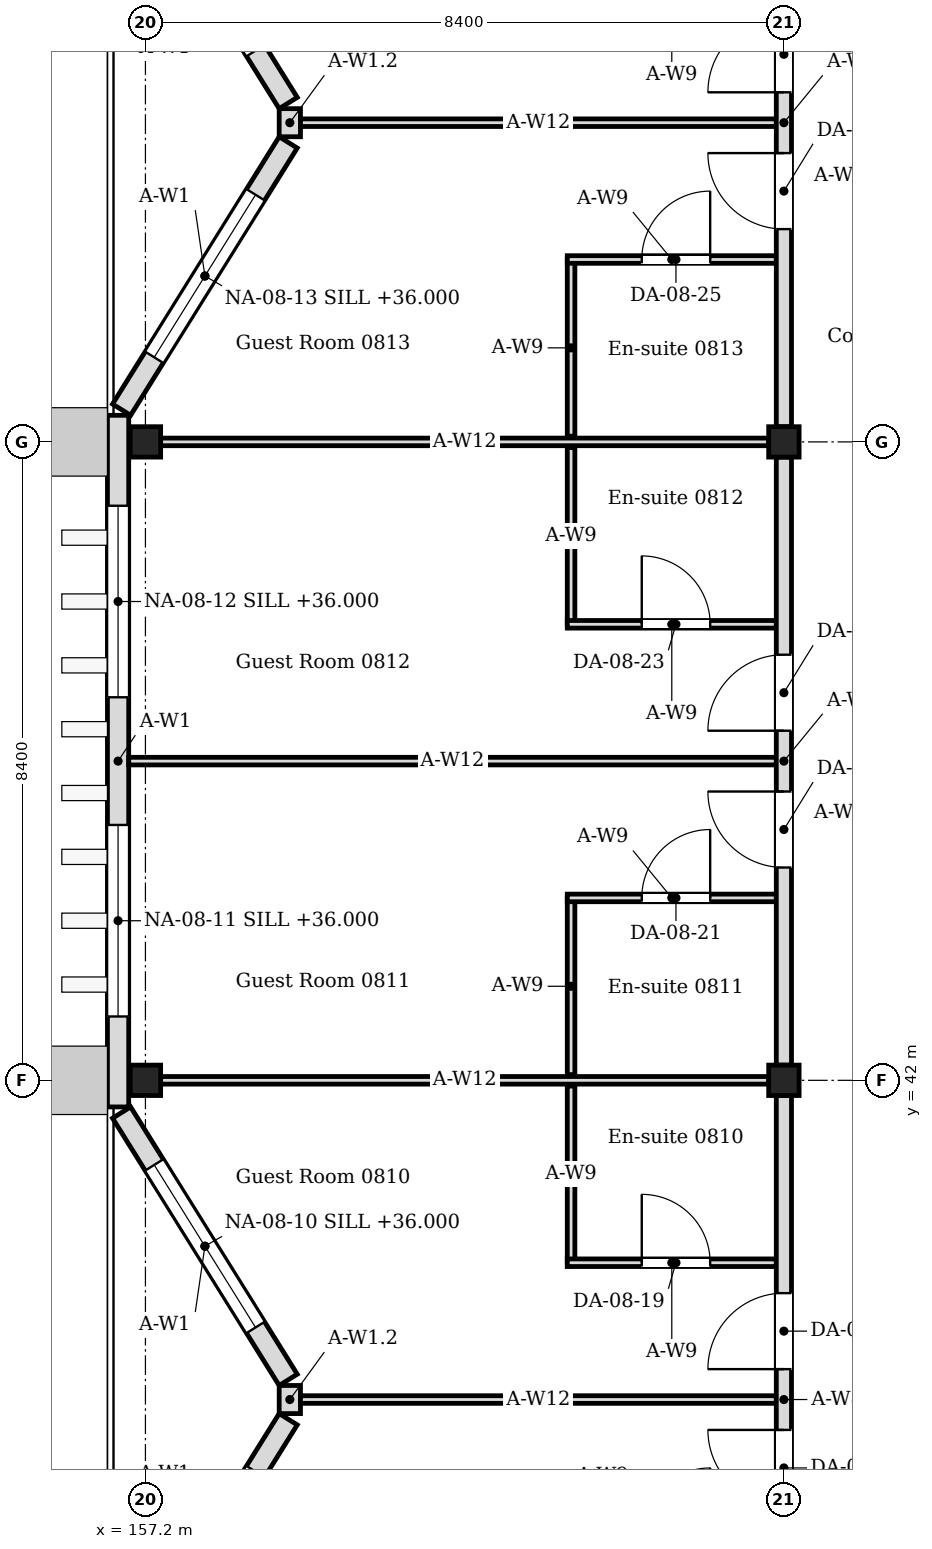
"""IFC4 building model, lengths in metres.
Left out: names, types, materials, properties, quantities, classifications, styles, units other than length and angle.
Written with IfcOpenShell. Run it as: python <this file> out.ifc"""

import sys

from ifc_helpers import new_model, si_unit, direction, frame, frame_2d, origin, origin_2d, place, context, subcontext, project, spatial, rectangle, i_section, extrude, element, fill, save


model = new_model("IFC4")
c1 = context("Model", 3, precision=1e-05, world=origin(), true_north=direction((0.0, 1.0)))
c2 = subcontext(c1, "Body", "Model", "MODEL_VIEW")
j1 = project(units=[si_unit("LENGTHUNIT", "METRE"), si_unit("PLANEANGLEUNIT", "RADIAN")], contexts=[c1])
p1 = place(None, origin())
s1 = spatial("IfcSite", under=j1, at=p1, CompositionType="ELEMENT")
p2 = place(p1, origin())
s2 = spatial("IfcBuilding", under=s1, at=p2, CompositionType="ELEMENT")
p3 = place(p2, frame((0.0, 0.0, 35.4)))
s3 = spatial("IfcBuildingStorey", under=s2, at=p3, CompositionType="ELEMENT", Elevation=35.4)
for number, where, z_axis, x_axis in (
    (1, (157.2, 42.0, 0.0), (0.0, 0.0, 1.0), (1.0, 0.0, 0.0)),
    (2, (157.2, 50.4, 0.0), (0.0, 0.0, 1.0), (1.0, 0.0, 0.0)),
    (3, (165.6, 42.0, 0.0), (0.0, 0.0, 1.0), (1.0, 0.0, 0.0)),
    (4, (165.6, 50.4, 0.0), (0.0, 0.0, 1.0), (1.0, 0.0, 0.0)),
):
    element("IfcColumn", number, at=place(p3, frame(where, z_axis=z_axis, x_axis=x_axis)), inside=s3, PredefinedType="COLUMN", context=c2, shape_type="SweptSolid", body=[
        extrude(i_section(OverallWidth=0.4, OverallDepth=0.4, WebThickness=0.013, FlangeThickness=0.021, FilletRadius=0.022, at=origin_2d()), origin(), (0.0, 0.0, 1.0), 4.2),
    ])
p4 = place(p3, frame((156.886, 34.024, 0.0), z_axis=(0.0, 0.0, 1.0), x_axis=(0.529018946142, 0.848610013271, 0.0)))
e5 = element("IfcWall", 5, at=p4, inside=s3, PredefinedType="SOLIDWALL", context=c2, shape_type="SweptSolid", body=[
    extrude(rectangle(XDim=4.144, YDim=0.28, at=frame_2d((2.072, 0.0))), origin(), (0.0, 0.0, 1.0), 4.05),
])
p5 = place(p4, frame((0.812, 0.0, 0.6)))
e6 = element("IfcOpeningElement", 6, at=p5, cuts=e5, PredefinedType="OPENING", context=c2, shape_type="SweptSolid", body=[
    extrude(rectangle(XDim=2.52, YDim=2.4, at=frame_2d((1.26, 1.2))), frame((0.0, 0.15, 0.0), z_axis=(0.0, -1.0, 0.0), x_axis=(1.0, 0.0, 0.0)), (0.0, 0.0, 1.0), 0.3),
])
p6 = place(p3, frame((159.079, 38.059, 0.0), z_axis=(0.0, 0.0, 1.0), x_axis=(-0.529018946142, 0.848610013271, 0.0)))
e7 = element("IfcWall", 7, at=p6, inside=s3, PredefinedType="SOLIDWALL", context=c2, shape_type="SweptSolid", body=[
    extrude(rectangle(XDim=4.144, YDim=0.28, at=frame_2d((2.072, 0.0))), origin(), (0.0, 0.0, 1.0), 4.05),
])
p7 = place(p6, frame((0.812, 0.0, 0.6)))
e8 = element("IfcOpeningElement", 8, at=p7, cuts=e7, PredefinedType="OPENING", context=c2, shape_type="SweptSolid", body=[
    extrude(rectangle(XDim=2.52, YDim=2.4, at=frame_2d((1.26, 1.2))), frame((0.0, 0.15, 0.0), z_axis=(0.0, -1.0, 0.0), x_axis=(1.0, 0.0, 0.0)), (0.0, 0.0, 1.0), 0.3),
])
p8 = place(p3, frame((159.1, 37.615, 0.0), z_axis=(0.0, 0.0, 1.0), x_axis=(0.0, 1.0, 0.0)))
e9 = element("IfcWall", 9, at=p8, inside=s3, PredefinedType="SOLIDWALL", context=c2, shape_type="SweptSolid", body=[
    extrude(rectangle(XDim=0.37, YDim=0.28, at=frame_2d((0.185, 0.0))), origin(), (0.0, 0.0, 1.0), 3.604),
])
p9 = place(p3, frame((156.84, 41.65, 0.0), z_axis=(0.0, 0.0, 1.0), x_axis=(0.0, 1.0, 0.0)))
e10 = element("IfcWall", 10, at=p9, inside=s3, PredefinedType="SOLIDWALL", context=c2, shape_type="SweptSolid", body=[
    extrude(rectangle(XDim=9.1, YDim=0.28, at=frame_2d((4.55, 0.0))), origin(), (0.0, 0.0, 1.0), 4.05),
])
p10 = place(p9, frame((1.19, 0.0, 0.6)))
e11 = element("IfcOpeningElement", 11, at=p10, cuts=e10, PredefinedType="OPENING", context=c2, shape_type="SweptSolid", body=[
    extrude(rectangle(XDim=2.52, YDim=2.4, at=frame_2d((1.26, 1.2))), frame((0.0, 0.15, 0.0), z_axis=(0.0, -1.0, 0.0), x_axis=(1.0, 0.0, 0.0)), (0.0, 0.0, 1.0), 0.3),
])
p11 = place(p9, frame((5.39, 0.0, 0.6)))
e12 = element("IfcOpeningElement", 12, at=p11, cuts=e10, PredefinedType="OPENING", context=c2, shape_type="SweptSolid", body=[
    extrude(rectangle(XDim=2.52, YDim=2.4, at=frame_2d((1.26, 1.2))), frame((0.0, 0.15, 0.0), z_axis=(0.0, -1.0, 0.0), x_axis=(1.0, 0.0, 0.0)), (0.0, 0.0, 1.0), 0.3),
])
p12 = place(p3, frame((156.886, 50.824, 0.0), z_axis=(0.0, 0.0, 1.0), x_axis=(0.529018946142, 0.848610013271, 0.0)))
e13 = element("IfcWall", 13, at=p12, inside=s3, PredefinedType="SOLIDWALL", context=c2, shape_type="SweptSolid", body=[
    extrude(rectangle(XDim=4.144, YDim=0.28, at=frame_2d((2.072, 0.0))), origin(), (0.0, 0.0, 1.0), 4.05),
])
p13 = place(p12, frame((0.812, 0.0, 0.6)))
e14 = element("IfcOpeningElement", 14, at=p13, cuts=e13, PredefinedType="OPENING", context=c2, shape_type="SweptSolid", body=[
    extrude(rectangle(XDim=2.52, YDim=2.4, at=frame_2d((1.26, 1.2))), frame((0.0, 0.15, 0.0), z_axis=(0.0, -1.0, 0.0), x_axis=(1.0, 0.0, 0.0)), (0.0, 0.0, 1.0), 0.3),
])
p14 = place(p3, frame((159.079, 54.859, 0.0), z_axis=(0.0, 0.0, 1.0), x_axis=(-0.528992500338, 0.848626498871, 0.0)))
e15 = element("IfcWall", 15, at=p14, inside=s3, PredefinedType="SOLIDWALL", context=c2, shape_type="SweptSolid", body=[
    extrude(rectangle(XDim=4.145, YDim=0.28, at=frame_2d((2.072, 0.0))), origin(), (0.0, 0.0, 1.0), 4.05),
])
p15 = place(p14, frame((0.812, 0.0, 0.6)))
e16 = element("IfcOpeningElement", 16, at=p15, cuts=e15, PredefinedType="OPENING", context=c2, shape_type="SweptSolid", body=[
    extrude(rectangle(XDim=2.52, YDim=2.4, at=frame_2d((1.26, 1.2))), frame((0.0, 0.15, 0.0), z_axis=(0.0, -1.0, 0.0), x_axis=(1.0, 0.0, 0.0)), (0.0, 0.0, 1.0), 0.3),
])
p16 = place(p3, frame((159.1, 54.415, 0.0), z_axis=(0.0, 0.0, 1.0), x_axis=(0.0, 1.0, 0.0)))
e17 = element("IfcWall", 17, at=p16, inside=s3, PredefinedType="SOLIDWALL", context=c2, shape_type="SweptSolid", body=[
    extrude(rectangle(XDim=0.37, YDim=0.28, at=frame_2d((0.185, 0.0))), origin(), (0.0, 0.0, 1.0), 3.604),
])
p17 = place(p3, frame((162.8, 39.6, 0.0), z_axis=(0.0, 0.0, 1.0), x_axis=(0.0, 1.0, 0.0)))
e18 = element("IfcWall", 18, at=p17, inside=s3, PredefinedType="PARTITIONING", context=c2, shape_type="SweptSolid", body=[
    extrude(rectangle(XDim=2.325, YDim=0.1, at=frame_2d((1.163, 0.0))), origin(), (0.0, 0.0, 1.0), 4.05),
])
p18 = place(p3, frame((162.75, 39.6, 0.0), z_axis=(0.0, 0.0, 1.0), x_axis=(1.0, 0.0, 0.0)))
e19 = element("IfcWall", 19, at=p18, inside=s3, PredefinedType="PARTITIONING", context=c2, shape_type="SweptSolid", body=[
    extrude(rectangle(XDim=2.75, YDim=0.1, at=frame_2d((1.375, 0.0))), origin(), (0.0, 0.0, 1.0), 4.05),
])
p19 = place(p18, frame((0.98, 0.0, 0.0)))
e20 = element("IfcOpeningElement", 20, at=p19, cuts=e19, PredefinedType="OPENING", context=c2, shape_type="SweptSolid", body=[
    extrude(rectangle(XDim=0.9, YDim=2.1, at=frame_2d((0.45, 1.05))), frame((0.0, 0.06, 0.0), z_axis=(0.0, -1.0, 0.0), x_axis=(1.0, 0.0, 0.0)), (0.0, 0.0, 1.0), 0.12),
])
p20 = place(p3, frame((162.8, 42.075, 0.0), z_axis=(0.0, 0.0, 1.0), x_axis=(0.0, 1.0, 0.0)))
e21 = element("IfcWall", 21, at=p20, inside=s3, PredefinedType="PARTITIONING", context=c2, shape_type="SweptSolid", body=[
    extrude(rectangle(XDim=2.325, YDim=0.1, at=frame_2d((1.163, 0.0))), origin(), (0.0, 0.0, 1.0), 4.05),
])
p21 = place(p3, frame((162.75, 44.4, 0.0), z_axis=(0.0, 0.0, 1.0), x_axis=(1.0, 0.0, 0.0)))
e22 = element("IfcWall", 22, at=p21, inside=s3, PredefinedType="PARTITIONING", context=c2, shape_type="SweptSolid", body=[
    extrude(rectangle(XDim=2.75, YDim=0.1, at=frame_2d((1.375, 0.0))), origin(), (0.0, 0.0, 1.0), 4.05),
])
p22 = place(p21, frame((0.98, 0.0, 0.0)))
e23 = element("IfcOpeningElement", 23, at=p22, cuts=e22, PredefinedType="OPENING", context=c2, shape_type="SweptSolid", body=[
    extrude(rectangle(XDim=0.9, YDim=2.1, at=frame_2d((0.45, 1.05))), frame((0.0, 0.06, 0.0), z_axis=(0.0, -1.0, 0.0), x_axis=(1.0, 0.0, 0.0)), (0.0, 0.0, 1.0), 0.12),
])
p23 = place(p3, frame((162.8, 48.0, 0.0), z_axis=(0.0, 0.0, 1.0), x_axis=(0.0, 1.0, 0.0)))
e24 = element("IfcWall", 24, at=p23, inside=s3, PredefinedType="PARTITIONING", context=c2, shape_type="SweptSolid", body=[
    extrude(rectangle(XDim=2.325, YDim=0.1, at=frame_2d((1.163, 0.0))), origin(), (0.0, 0.0, 1.0), 4.05),
])
p24 = place(p3, frame((162.75, 48.0, 0.0), z_axis=(0.0, 0.0, 1.0), x_axis=(1.0, 0.0, 0.0)))
e25 = element("IfcWall", 25, at=p24, inside=s3, PredefinedType="PARTITIONING", context=c2, shape_type="SweptSolid", body=[
    extrude(rectangle(XDim=2.75, YDim=0.1, at=frame_2d((1.375, 0.0))), origin(), (0.0, 0.0, 1.0), 4.05),
])
p25 = place(p24, frame((0.98, 0.0, 0.0)))
e26 = element("IfcOpeningElement", 26, at=p25, cuts=e25, PredefinedType="OPENING", context=c2, shape_type="SweptSolid", body=[
    extrude(rectangle(XDim=0.9, YDim=2.1, at=frame_2d((0.45, 1.05))), frame((0.0, 0.06, 0.0), z_axis=(0.0, -1.0, 0.0), x_axis=(1.0, 0.0, 0.0)), (0.0, 0.0, 1.0), 0.12),
])
p26 = place(p3, frame((162.8, 50.475, 0.0), z_axis=(0.0, 0.0, 1.0), x_axis=(0.0, 1.0, 0.0)))
e27 = element("IfcWall", 27, at=p26, inside=s3, PredefinedType="PARTITIONING", context=c2, shape_type="SweptSolid", body=[
    extrude(rectangle(XDim=2.325, YDim=0.1, at=frame_2d((1.163, 0.0))), origin(), (0.0, 0.0, 1.0), 4.05),
])
p27 = place(p3, frame((162.75, 52.8, 0.0), z_axis=(0.0, 0.0, 1.0), x_axis=(1.0, 0.0, 0.0)))
e28 = element("IfcWall", 28, at=p27, inside=s3, PredefinedType="PARTITIONING", context=c2, shape_type="SweptSolid", body=[
    extrude(rectangle(XDim=2.75, YDim=0.1, at=frame_2d((1.375, 0.0))), origin(), (0.0, 0.0, 1.0), 4.05),
])
p28 = place(p27, frame((0.98, 0.0, 0.0)))
e29 = element("IfcOpeningElement", 29, at=p28, cuts=e28, PredefinedType="OPENING", context=c2, shape_type="SweptSolid", body=[
    extrude(rectangle(XDim=0.9, YDim=2.1, at=frame_2d((0.45, 1.05))), frame((0.0, 0.06, 0.0), z_axis=(0.0, -1.0, 0.0), x_axis=(1.0, 0.0, 0.0)), (0.0, 0.0, 1.0), 0.12),
])
for number, where, z_axis, x_axis in (
    (30, (157.4, 42.0, 0.0), (0.0, 0.0, 1.0), (1.0, 0.0, 0.0)),
    (31, (157.4, 50.4, 0.0), (0.0, 0.0, 1.0), (1.0, 0.0, 0.0)),
):
    element("IfcWall", number, at=place(p3, frame(where, z_axis=z_axis, x_axis=x_axis)), inside=s3, PredefinedType="PARTITIONING", context=c2, shape_type="SweptSolid", body=[
        extrude(rectangle(XDim=8.0, YDim=0.1, at=frame_2d((4.0, 0.0))), origin(), (0.0, 0.0, 1.0), 3.604),
    ])
p29 = place(p3, frame((159.24, 37.8, 0.0), z_axis=(0.0, 0.0, 1.0), x_axis=(1.0, 0.0, 0.0)))
e32 = element("IfcWall", 32, at=p29, inside=s3, PredefinedType="PARTITIONING", context=c2, shape_type="SweptSolid", body=[
    extrude(rectangle(XDim=6.26, YDim=0.1, at=frame_2d((3.13, 0.0))), origin(), (0.0, 0.0, 1.0), 3.604),
])
p30 = place(p3, frame((156.98, 46.2, 0.0), z_axis=(0.0, 0.0, 1.0), x_axis=(1.0, 0.0, 0.0)))
e33 = element("IfcWall", 33, at=p30, inside=s3, PredefinedType="PARTITIONING", context=c2, shape_type="SweptSolid", body=[
    extrude(rectangle(XDim=8.52, YDim=0.1, at=frame_2d((4.26, 0.0))), origin(), (0.0, 0.0, 1.0), 3.604),
])
p31 = place(p3, frame((159.24, 54.6, 0.0), z_axis=(0.0, 0.0, 1.0), x_axis=(1.0, 0.0, 0.0)))
e34 = element("IfcWall", 34, at=p31, inside=s3, PredefinedType="PARTITIONING", context=c2, shape_type="SweptSolid", body=[
    extrude(rectangle(XDim=6.26, YDim=0.1, at=frame_2d((3.13, 0.0))), origin(), (0.0, 0.0, 1.0), 3.604),
])
p32 = place(p3, frame((165.6, 33.8, 0.0), z_axis=(0.0, 0.0, 1.0), x_axis=(0.0, 1.0, 0.0)))
e35 = element("IfcWall", 35, at=p32, inside=s3, PredefinedType="PARTITIONING", context=c2, shape_type="SweptSolid", body=[
    extrude(rectangle(XDim=8.0, YDim=0.2, at=frame_2d((4.0, 0.0))), origin(), (0.0, 0.0, 1.0), 3.45),
])
p33 = place(p32, frame((2.6, 0.0, 0.0)))
e36 = element("IfcOpeningElement", 36, at=p33, cuts=e35, PredefinedType="OPENING", context=c2, shape_type="SweptSolid", body=[
    extrude(rectangle(XDim=1.0, YDim=2.4, at=frame_2d((0.5, 1.2))), frame((0.0, 0.11, 0.0), z_axis=(0.0, -1.0, 0.0), x_axis=(1.0, 0.0, 0.0)), (0.0, 0.0, 1.0), 0.22),
])
p34 = place(p32, frame((4.4, 0.0, 0.0)))
e37 = element("IfcOpeningElement", 37, at=p34, cuts=e35, PredefinedType="OPENING", context=c2, shape_type="SweptSolid", body=[
    extrude(rectangle(XDim=1.0, YDim=2.4, at=frame_2d((0.5, 1.2))), frame((0.0, 0.11, 0.0), z_axis=(0.0, -1.0, 0.0), x_axis=(1.0, 0.0, 0.0)), (0.0, 0.0, 1.0), 0.22),
])
p35 = place(p3, frame((165.6, 42.2, 0.0), z_axis=(0.0, 0.0, 1.0), x_axis=(0.0, 1.0, 0.0)))
e38 = element("IfcWall", 38, at=p35, inside=s3, PredefinedType="PARTITIONING", context=c2, shape_type="SweptSolid", body=[
    extrude(rectangle(XDim=8.0, YDim=0.2, at=frame_2d((4.0, 0.0))), origin(), (0.0, 0.0, 1.0), 3.45),
])
p36 = place(p35, frame((2.6, 0.0, 0.0)))
e39 = element("IfcOpeningElement", 39, at=p36, cuts=e38, PredefinedType="OPENING", context=c2, shape_type="SweptSolid", body=[
    extrude(rectangle(XDim=1.0, YDim=2.4, at=frame_2d((0.5, 1.2))), frame((0.0, 0.11, 0.0), z_axis=(0.0, -1.0, 0.0), x_axis=(1.0, 0.0, 0.0)), (0.0, 0.0, 1.0), 0.22),
])
p37 = place(p35, frame((4.4, 0.0, 0.0)))
e40 = element("IfcOpeningElement", 40, at=p37, cuts=e38, PredefinedType="OPENING", context=c2, shape_type="SweptSolid", body=[
    extrude(rectangle(XDim=1.0, YDim=2.4, at=frame_2d((0.5, 1.2))), frame((0.0, 0.11, 0.0), z_axis=(0.0, -1.0, 0.0), x_axis=(1.0, 0.0, 0.0)), (0.0, 0.0, 1.0), 0.22),
])
p38 = place(p3, frame((165.6, 50.6, 0.0), z_axis=(0.0, 0.0, 1.0), x_axis=(0.0, 1.0, 0.0)))
e41 = element("IfcWall", 41, at=p38, inside=s3, PredefinedType="PARTITIONING", context=c2, shape_type="SweptSolid", body=[
    extrude(rectangle(XDim=8.0, YDim=0.2, at=frame_2d((4.0, 0.0))), origin(), (0.0, 0.0, 1.0), 3.45),
])
p39 = place(p38, frame((2.6, 0.0, 0.0)))
e42 = element("IfcOpeningElement", 42, at=p39, cuts=e41, PredefinedType="OPENING", context=c2, shape_type="SweptSolid", body=[
    extrude(rectangle(XDim=1.0, YDim=2.4, at=frame_2d((0.5, 1.2))), frame((0.0, 0.11, 0.0), z_axis=(0.0, -1.0, 0.0), x_axis=(1.0, 0.0, 0.0)), (0.0, 0.0, 1.0), 0.22),
])
p40 = place(p38, frame((4.4, 0.0, 0.0)))
e43 = element("IfcOpeningElement", 43, at=p40, cuts=e41, PredefinedType="OPENING", context=c2, shape_type="SweptSolid", body=[
    extrude(rectangle(XDim=1.0, YDim=2.4, at=frame_2d((0.5, 1.2))), frame((0.0, 0.11, 0.0), z_axis=(0.0, -1.0, 0.0), x_axis=(1.0, 0.0, 0.0)), (0.0, 0.0, 1.0), 0.22),
])
p41 = place(p7, origin())
e44 = element("IfcWindow", 44, at=p41, inside=s3, PartitioningType="SINGLE_PANEL", PredefinedType="WINDOW", context=c2, shape_type="SweptSolid", body=[
    extrude(rectangle(XDim=2.52, YDim=2.4, at=frame_2d((1.26, 1.2))), frame((0.0, 0.03, 0.0), z_axis=(0.0, -1.0, 0.0), x_axis=(1.0, 0.0, 0.0)), (0.0, 0.0, 1.0), 0.06),
])
fill(e8, e44)
p42 = place(p10, origin())
e45 = element("IfcWindow", 45, at=p42, inside=s3, PartitioningType="SINGLE_PANEL", PredefinedType="WINDOW", context=c2, shape_type="SweptSolid", body=[
    extrude(rectangle(XDim=2.52, YDim=2.4, at=frame_2d((1.26, 1.2))), frame((0.0, 0.03, 0.0), z_axis=(0.0, -1.0, 0.0), x_axis=(1.0, 0.0, 0.0)), (0.0, 0.0, 1.0), 0.06),
])
fill(e11, e45)
p43 = place(p11, origin())
e46 = element("IfcWindow", 46, at=p43, inside=s3, PartitioningType="SINGLE_PANEL", PredefinedType="WINDOW", context=c2, shape_type="SweptSolid", body=[
    extrude(rectangle(XDim=2.52, YDim=2.4, at=frame_2d((1.26, 1.2))), frame((0.0, 0.03, 0.0), z_axis=(0.0, -1.0, 0.0), x_axis=(1.0, 0.0, 0.0)), (0.0, 0.0, 1.0), 0.06),
])
fill(e12, e46)
p44 = place(p13, origin())
e47 = element("IfcWindow", 47, at=p44, inside=s3, PartitioningType="SINGLE_PANEL", PredefinedType="WINDOW", context=c2, shape_type="SweptSolid", body=[
    extrude(rectangle(XDim=2.52, YDim=2.4, at=frame_2d((1.26, 1.2))), frame((0.0, 0.03, 0.0), z_axis=(0.0, -1.0, 0.0), x_axis=(1.0, 0.0, 0.0)), (0.0, 0.0, 1.0), 0.06),
])
fill(e14, e47)
p45 = place(p33, origin())
e48 = element("IfcDoor", 48, at=p45, inside=s3, OperationType="SINGLE_SWING_RIGHT", PredefinedType="DOOR", context=c2, shape_type="SweptSolid", body=[
    extrude(rectangle(XDim=1.0, YDim=2.4, at=frame_2d((0.5, 1.2))), frame((0.0, 0.025, 0.0), z_axis=(0.0, -1.0, 0.0), x_axis=(1.0, 0.0, 0.0)), (0.0, 0.0, 1.0), 0.05),
])
fill(e36, e48)
p46 = place(p19, origin())
e49 = element("IfcDoor", 49, at=p46, inside=s3, OperationType="SINGLE_SWING_LEFT", PredefinedType="DOOR", context=c2, shape_type="SweptSolid", body=[
    extrude(rectangle(XDim=0.9, YDim=2.1, at=frame_2d((0.45, 1.05))), frame((0.0, 0.025, 0.0), z_axis=(0.0, -1.0, 0.0), x_axis=(1.0, 0.0, 0.0)), (0.0, 0.0, 1.0), 0.05),
])
fill(e20, e49)
p47 = place(p34, origin())
e50 = element("IfcDoor", 50, at=p47, inside=s3, OperationType="SINGLE_SWING_LEFT", PredefinedType="DOOR", context=c2, shape_type="SweptSolid", body=[
    extrude(rectangle(XDim=1.0, YDim=2.4, at=frame_2d((0.5, 1.2))), frame((0.0, 0.025, 0.0), z_axis=(0.0, -1.0, 0.0), x_axis=(1.0, 0.0, 0.0)), (0.0, 0.0, 1.0), 0.05),
])
fill(e37, e50)
p48 = place(p22, origin())
e51 = element("IfcDoor", 51, at=p48, inside=s3, OperationType="SINGLE_SWING_RIGHT", PredefinedType="DOOR", context=c2, shape_type="SweptSolid", body=[
    extrude(rectangle(XDim=0.9, YDim=2.1, at=frame_2d((0.45, 1.05))), frame((0.0, 0.025, 0.0), z_axis=(0.0, -1.0, 0.0), x_axis=(1.0, 0.0, 0.0)), (0.0, 0.0, 1.0), 0.05),
])
fill(e23, e51)
p49 = place(p36, origin())
e52 = element("IfcDoor", 52, at=p49, inside=s3, OperationType="SINGLE_SWING_RIGHT", PredefinedType="DOOR", context=c2, shape_type="SweptSolid", body=[
    extrude(rectangle(XDim=1.0, YDim=2.4, at=frame_2d((0.5, 1.2))), frame((0.0, 0.025, 0.0), z_axis=(0.0, -1.0, 0.0), x_axis=(1.0, 0.0, 0.0)), (0.0, 0.0, 1.0), 0.05),
])
fill(e39, e52)
p50 = place(p25, origin())
e53 = element("IfcDoor", 53, at=p50, inside=s3, OperationType="SINGLE_SWING_LEFT", PredefinedType="DOOR", context=c2, shape_type="SweptSolid", body=[
    extrude(rectangle(XDim=0.9, YDim=2.1, at=frame_2d((0.45, 1.05))), frame((0.0, 0.025, 0.0), z_axis=(0.0, -1.0, 0.0), x_axis=(1.0, 0.0, 0.0)), (0.0, 0.0, 1.0), 0.05),
])
fill(e26, e53)
p51 = place(p37, origin())
e54 = element("IfcDoor", 54, at=p51, inside=s3, OperationType="SINGLE_SWING_LEFT", PredefinedType="DOOR", context=c2, shape_type="SweptSolid", body=[
    extrude(rectangle(XDim=1.0, YDim=2.4, at=frame_2d((0.5, 1.2))), frame((0.0, 0.025, 0.0), z_axis=(0.0, -1.0, 0.0), x_axis=(1.0, 0.0, 0.0)), (0.0, 0.0, 1.0), 0.05),
])
fill(e40, e54)
p52 = place(p28, origin())
e55 = element("IfcDoor", 55, at=p52, inside=s3, OperationType="SINGLE_SWING_RIGHT", PredefinedType="DOOR", context=c2, shape_type="SweptSolid", body=[
    extrude(rectangle(XDim=0.9, YDim=2.1, at=frame_2d((0.45, 1.05))), frame((0.0, 0.025, 0.0), z_axis=(0.0, -1.0, 0.0), x_axis=(1.0, 0.0, 0.0)), (0.0, 0.0, 1.0), 0.05),
])
fill(e29, e55)
p53 = place(p39, origin())
e56 = element("IfcDoor", 56, at=p53, inside=s3, OperationType="SINGLE_SWING_RIGHT", PredefinedType="DOOR", context=c2, shape_type="SweptSolid", body=[
    extrude(rectangle(XDim=1.0, YDim=2.4, at=frame_2d((0.5, 1.2))), frame((0.0, 0.025, 0.0), z_axis=(0.0, -1.0, 0.0), x_axis=(1.0, 0.0, 0.0)), (0.0, 0.0, 1.0), 0.05),
])
fill(e42, e56)
p54 = place(p40, origin())
e57 = element("IfcDoor", 57, at=p54, inside=s3, OperationType="SINGLE_SWING_LEFT", PredefinedType="DOOR", context=c2, shape_type="SweptSolid", body=[
    extrude(rectangle(XDim=1.0, YDim=2.4, at=frame_2d((0.5, 1.2))), frame((0.0, 0.025, 0.0), z_axis=(0.0, -1.0, 0.0), x_axis=(1.0, 0.0, 0.0)), (0.0, 0.0, 1.0), 0.05),
])
fill(e43, e57)
save(model, sys.argv[1])
